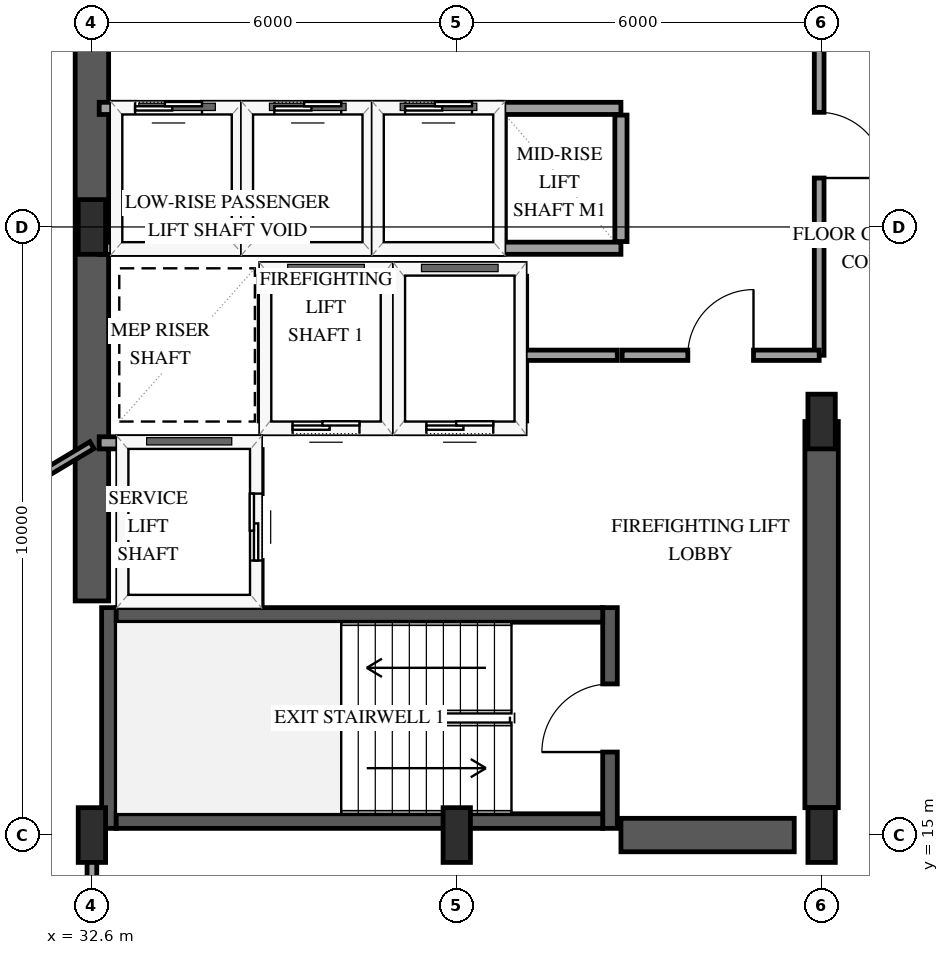
"""IFC4 building model, lengths in metres.
Left out: names, types, materials, properties, quantities, classifications, styles, units other than length and angle.
Written with IfcOpenShell. Run it as: python <this file> out.ifc"""

import sys

from ifc_helpers import new_model, si_unit, direction, frame, frame_2d, origin, origin_2d, place, context, subcontext, project, spatial, rectangle, extrude, element, fill, save


model = new_model("IFC4")
c1 = context("Model", 3, precision=1e-05, world=origin(), true_north=direction((0.0, 1.0)))
c2 = subcontext(c1, "Body", "Model", "MODEL_VIEW")
j1 = project(units=[si_unit("LENGTHUNIT", "METRE"), si_unit("PLANEANGLEUNIT", "RADIAN")], contexts=[c1])
p1 = place(None, origin())
s1 = spatial("IfcSite", under=j1, at=p1, CompositionType="ELEMENT")
p2 = place(p1, origin())
s2 = spatial("IfcBuilding", under=s1, at=p2, CompositionType="ELEMENT")
p3 = place(p2, frame((0.0, 0.0, 110.8)))
s3 = spatial("IfcBuildingStorey", under=s2, at=p3, CompositionType="ELEMENT", Elevation=110.8)
p4 = place(p3, frame((32.88, 15.11, 0.0), z_axis=(0.0, 0.0, 1.0), x_axis=(0.0, 1.0, 0.0)))
e1 = element("IfcWall", 1, at=p4, inside=s3, PredefinedType="SHEAR", context=c2, shape_type="SweptSolid", body=[
    extrude(rectangle(XDim=3.63, YDim=0.24, at=frame_2d((1.815, 0.0))), origin(), (0.0, 0.0, 1.0), 3.9),
])
p5 = place(p3, frame((41.12, 15.11, 0.0), z_axis=(0.0, 0.0, 1.0), x_axis=(0.0, 1.0, 0.0)))
e2 = element("IfcWall", 2, at=p5, inside=s3, PredefinedType="SHEAR", context=c2, shape_type="SweptSolid", body=[
    extrude(rectangle(XDim=3.63, YDim=0.24, at=frame_2d((1.815, 0.0))), origin(), (0.0, 0.0, 1.0), 3.9),
])
p6 = place(p5, frame((1.255, 0.0, 0.0)))
e3 = element("IfcOpeningElement", 3, at=p6, cuts=e2, PredefinedType="OPENING", context=c2, shape_type="SweptSolid", body=[
    extrude(rectangle(XDim=1.12, YDim=2.15, at=frame_2d((0.56, 1.075))), frame((0.0, 0.13, 0.0), z_axis=(0.0, -1.0, 0.0), x_axis=(1.0, 0.0, 0.0)), (0.0, 0.0, 1.0), 0.26),
])
for number, where, z_axis, x_axis in (
    (4, (33.0, 15.23, 0.0), (0.0, 0.0, 1.0), (1.0, 0.0, 0.0)),
    (5, (33.0, 18.62, 0.0), (0.0, 0.0, 1.0), (1.0, 0.0, 0.0)),
):
    element("IfcWall", number, at=place(p3, frame(where, z_axis=z_axis, x_axis=x_axis)), inside=s3, PredefinedType="SHEAR", context=c2, shape_type="SweptSolid", body=[
        extrude(rectangle(XDim=8.0, YDim=0.24, at=frame_2d((4.0, 0.0))), origin(), (0.0, 0.0, 1.0), 3.9),
    ])
p7 = place(p3, frame((32.6, 18.85, 0.0), z_axis=(0.0, 0.0, 1.0), x_axis=(0.0, 1.0, 0.0)))
e6 = element("IfcWall", 6, at=p7, inside=s3, PredefinedType="SHEAR", context=c2, shape_type="SweptSolid", body=[
    extrude(rectangle(XDim=12.3, YDim=0.55, at=frame_2d((6.15, 0.0))), origin(), (0.0, 0.0, 1.0), 3.9),
])
p8 = place(p3, frame((41.3, 15.0, 0.0), z_axis=(0.0, 0.0, 1.0), x_axis=(1.0, 0.0, 0.0)))
e7 = element("IfcWall", 7, at=p8, inside=s3, PredefinedType="SHEAR", context=c2, shape_type="SweptSolid", body=[
    extrude(rectangle(XDim=2.85, YDim=0.55, at=frame_2d((1.425, 0.0))), origin(), (0.0, 0.0, 1.0), 3.9),
])
p9 = place(p3, frame((44.6, 15.45, 0.0), z_axis=(0.0, 0.0, 1.0), x_axis=(0.0, 1.0, 0.0)))
e8 = element("IfcWall", 8, at=p9, inside=s3, PredefinedType="SHEAR", context=c2, shape_type="SweptSolid", body=[
    extrude(rectangle(XDim=6.35, YDim=0.55, at=frame_2d((3.175, 0.0))), origin(), (0.0, 0.0, 1.0), 3.9),
])
for number, where, z_axis, x_axis in (
    (9, (32.6, 15.0, 0.0), (0.0, 0.0, 1.0), (1.0, 0.0, 0.0)),
    (10, (32.6, 25.0, 0.0), (0.0, 0.0, 1.0), (1.0, 0.0, 0.0)),
    (11, (38.6, 15.0, 0.0), (0.0, 0.0, 1.0), (1.0, 0.0, 0.0)),
    (12, (44.6, 15.0, 0.0), (0.0, 0.0, 1.0), (1.0, 0.0, 0.0)),
    (13, (44.6, 21.8, 0.0), (0.0, 0.0, 1.0), (1.0, 0.0, 0.0)),
):
    element("IfcColumn", number, at=place(p3, frame(where, z_axis=z_axis, x_axis=x_axis)), inside=s3, PredefinedType="PILASTER", context=c2, shape_type="SweptSolid", body=[
        extrude(rectangle(XDim=0.45, YDim=0.9, at=origin_2d()), origin(), (0.0, 0.0, 1.0), 3.9),
    ])
p10 = place(p3, frame((35.45, 21.7, 0.0), z_axis=(0.0, 0.0, 1.0), x_axis=(1.0, 0.0, 0.0)))
e14 = element("IfcWall", 14, at=p10, inside=s3, PredefinedType="SOLIDWALL", context=c2, shape_type="SweptSolid", body=[
    extrude(rectangle(XDim=2.0, YDim=0.2, at=frame_2d((1.0, 0.0))), origin(), (0.0, 0.0, 1.0), 3.6),
])
p11 = place(p10, frame((0.45, 0.0, 0.0)))
e15 = element("IfcOpeningElement", 15, at=p11, cuts=e14, PredefinedType="OPENING", context=c2, shape_type="SweptSolid", body=[
    extrude(rectangle(XDim=1.1, YDim=2.15, at=frame_2d((0.55, 1.075))), frame((0.0, 0.11, 0.0), z_axis=(0.0, -1.0, 0.0), x_axis=(1.0, 0.0, 0.0)), (0.0, 0.0, 1.0), 0.22),
])
p12 = place(p3, frame((35.45, 24.3, 0.0), z_axis=(0.0, 0.0, 1.0), x_axis=(1.0, 0.0, 0.0)))
e16 = element("IfcWall", 16, at=p12, inside=s3, PredefinedType="SOLIDWALL", context=c2, shape_type="SweptSolid", body=[
    extrude(rectangle(XDim=2.0, YDim=0.2, at=frame_2d((1.0, 0.0))), origin(), (0.0, 0.0, 1.0), 3.6),
])
for number, where, z_axis, x_axis in (
    (17, (35.45, 21.81, 0.0), (0.0, 0.0, 1.0), (0.0, 1.0, 0.0)),
    (18, (37.45, 21.81, 0.0), (0.0, 0.0, 1.0), (0.0, 1.0, 0.0)),
):
    element("IfcWall", number, at=place(p3, frame(where, z_axis=z_axis, x_axis=x_axis)), inside=s3, PredefinedType="SOLIDWALL", context=c2, shape_type="SweptSolid", body=[
        extrude(rectangle(XDim=2.38, YDim=0.2, at=frame_2d((1.19, 0.0))), origin(), (0.0, 0.0, 1.0), 3.6),
    ])
p13 = place(p3, frame((37.65, 21.7, 0.0), z_axis=(0.0, 0.0, 1.0), x_axis=(1.0, 0.0, 0.0)))
e19 = element("IfcWall", 19, at=p13, inside=s3, PredefinedType="SOLIDWALL", context=c2, shape_type="SweptSolid", body=[
    extrude(rectangle(XDim=2.0, YDim=0.2, at=frame_2d((1.0, 0.0))), origin(), (0.0, 0.0, 1.0), 3.6),
])
p14 = place(p13, frame((0.45, 0.0, 0.0)))
e20 = element("IfcOpeningElement", 20, at=p14, cuts=e19, PredefinedType="OPENING", context=c2, shape_type="SweptSolid", body=[
    extrude(rectangle(XDim=1.1, YDim=2.15, at=frame_2d((0.55, 1.075))), frame((0.0, 0.11, 0.0), z_axis=(0.0, -1.0, 0.0), x_axis=(1.0, 0.0, 0.0)), (0.0, 0.0, 1.0), 0.22),
])
p15 = place(p3, frame((37.65, 24.3, 0.0), z_axis=(0.0, 0.0, 1.0), x_axis=(1.0, 0.0, 0.0)))
e21 = element("IfcWall", 21, at=p15, inside=s3, PredefinedType="SOLIDWALL", context=c2, shape_type="SweptSolid", body=[
    extrude(rectangle(XDim=2.0, YDim=0.2, at=frame_2d((1.0, 0.0))), origin(), (0.0, 0.0, 1.0), 3.6),
])
p16 = place(p3, frame((39.65, 21.81, 0.0), z_axis=(0.0, 0.0, 1.0), x_axis=(0.0, 1.0, 0.0)))
e22 = element("IfcWall", 22, at=p16, inside=s3, PredefinedType="SOLIDWALL", context=c2, shape_type="SweptSolid", body=[
    extrude(rectangle(XDim=2.38, YDim=0.2, at=frame_2d((1.19, 0.0))), origin(), (0.0, 0.0, 1.0), 3.6),
])
p17 = place(p3, frame((32.72, 21.45, 0.0), z_axis=(0.0, 0.0, 1.0), x_axis=(1.0, 0.0, 0.0)))
e23 = element("IfcWall", 23, at=p17, inside=s3, PredefinedType="SOLIDWALL", context=c2, shape_type="SweptSolid", body=[
    extrude(rectangle(XDim=2.58, YDim=0.2, at=frame_2d((1.29, 0.0))), origin(), (0.0, 0.0, 1.0), 3.6),
])
p18 = place(p3, frame((35.3, 18.79, 0.0), z_axis=(0.0, 0.0, 1.0), x_axis=(0.0, 1.0, 0.0)))
e24 = element("IfcWall", 24, at=p18, inside=s3, PredefinedType="SOLIDWALL", context=c2, shape_type="SweptSolid", body=[
    extrude(rectangle(XDim=2.55, YDim=0.2, at=frame_2d((1.275, 0.0))), origin(), (0.0, 0.0, 1.0), 3.6),
])
p19 = place(p18, frame((0.725, 0.0, 0.0)))
e25 = element("IfcOpeningElement", 25, at=p19, cuts=e24, PredefinedType="OPENING", context=c2, shape_type="SweptSolid", body=[
    extrude(rectangle(XDim=1.1, YDim=2.15, at=frame_2d((0.55, 1.075))), frame((0.0, 0.11, 0.0), z_axis=(0.0, -1.0, 0.0), x_axis=(1.0, 0.0, 0.0)), (0.0, 0.0, 1.0), 0.22),
])
p20 = place(p3, frame((32.72, 24.65, 0.0), z_axis=(0.0, 0.0, 1.0), x_axis=(1.0, 0.0, 0.0)))
e26 = element("IfcWall", 26, at=p20, inside=s3, PredefinedType="SOLIDWALL", context=c2, shape_type="SweptSolid", body=[
    extrude(rectangle(XDim=2.28, YDim=0.2, at=frame_2d((1.14, 0.0))), origin(), (0.0, 0.0, 1.0), 3.6),
])
p21 = place(p3, frame((32.72, 26.95, 0.0), z_axis=(0.0, 0.0, 1.0), x_axis=(1.0, 0.0, 0.0)))
e27 = element("IfcWall", 27, at=p21, inside=s3, PredefinedType="SOLIDWALL", context=c2, shape_type="SweptSolid", body=[
    extrude(rectangle(XDim=2.28, YDim=0.2, at=frame_2d((1.14, 0.0))), origin(), (0.0, 0.0, 1.0), 3.6),
])
p22 = place(p21, frame((0.59, 0.0, 0.0)))
e28 = element("IfcOpeningElement", 28, at=p22, cuts=e27, PredefinedType="OPENING", context=c2, shape_type="SweptSolid", body=[
    extrude(rectangle(XDim=1.1, YDim=2.15, at=frame_2d((0.55, 1.075))), frame((0.0, 0.11, 0.0), z_axis=(0.0, -1.0, 0.0), x_axis=(1.0, 0.0, 0.0)), (0.0, 0.0, 1.0), 0.22),
])
p23 = place(p3, frame((35.0, 24.76, 0.0), z_axis=(0.0, 0.0, 1.0), x_axis=(0.0, 1.0, 0.0)))
e29 = element("IfcWall", 29, at=p23, inside=s3, PredefinedType="SOLIDWALL", context=c2, shape_type="SweptSolid", body=[
    extrude(rectangle(XDim=2.08, YDim=0.2, at=frame_2d((1.04, 0.0))), origin(), (0.0, 0.0, 1.0), 3.6),
])
p24 = place(p3, frame((35.15, 24.65, 0.0), z_axis=(0.0, 0.0, 1.0), x_axis=(1.0, 0.0, 0.0)))
e30 = element("IfcWall", 30, at=p24, inside=s3, PredefinedType="SOLIDWALL", context=c2, shape_type="SweptSolid", body=[
    extrude(rectangle(XDim=2.0, YDim=0.2, at=frame_2d((1.0, 0.0))), origin(), (0.0, 0.0, 1.0), 3.6),
])
p25 = place(p3, frame((35.15, 26.95, 0.0), z_axis=(0.0, 0.0, 1.0), x_axis=(1.0, 0.0, 0.0)))
e31 = element("IfcWall", 31, at=p25, inside=s3, PredefinedType="SOLIDWALL", context=c2, shape_type="SweptSolid", body=[
    extrude(rectangle(XDim=2.0, YDim=0.2, at=frame_2d((1.0, 0.0))), origin(), (0.0, 0.0, 1.0), 3.6),
])
p26 = place(p25, frame((0.45, 0.0, 0.0)))
e32 = element("IfcOpeningElement", 32, at=p26, cuts=e31, PredefinedType="OPENING", context=c2, shape_type="SweptSolid", body=[
    extrude(rectangle(XDim=1.1, YDim=2.15, at=frame_2d((0.55, 1.075))), frame((0.0, 0.11, 0.0), z_axis=(0.0, -1.0, 0.0), x_axis=(1.0, 0.0, 0.0)), (0.0, 0.0, 1.0), 0.22),
])
p27 = place(p3, frame((37.15, 24.76, 0.0), z_axis=(0.0, 0.0, 1.0), x_axis=(0.0, 1.0, 0.0)))
e33 = element("IfcWall", 33, at=p27, inside=s3, PredefinedType="SOLIDWALL", context=c2, shape_type="SweptSolid", body=[
    extrude(rectangle(XDim=2.08, YDim=0.2, at=frame_2d((1.04, 0.0))), origin(), (0.0, 0.0, 1.0), 3.6),
])
p28 = place(p3, frame((37.3, 24.65, 0.0), z_axis=(0.0, 0.0, 1.0), x_axis=(1.0, 0.0, 0.0)))
e34 = element("IfcWall", 34, at=p28, inside=s3, PredefinedType="SOLIDWALL", context=c2, shape_type="SweptSolid", body=[
    extrude(rectangle(XDim=2.0, YDim=0.2, at=frame_2d((1.0, 0.0))), origin(), (0.0, 0.0, 1.0), 3.6),
])
p29 = place(p3, frame((37.3, 26.95, 0.0), z_axis=(0.0, 0.0, 1.0), x_axis=(1.0, 0.0, 0.0)))
e35 = element("IfcWall", 35, at=p29, inside=s3, PredefinedType="SOLIDWALL", context=c2, shape_type="SweptSolid", body=[
    extrude(rectangle(XDim=2.0, YDim=0.2, at=frame_2d((1.0, 0.0))), origin(), (0.0, 0.0, 1.0), 3.6),
])
p30 = place(p29, frame((0.45, 0.0, 0.0)))
e36 = element("IfcOpeningElement", 36, at=p30, cuts=e35, PredefinedType="OPENING", context=c2, shape_type="SweptSolid", body=[
    extrude(rectangle(XDim=1.1, YDim=2.15, at=frame_2d((0.55, 1.075))), frame((0.0, 0.11, 0.0), z_axis=(0.0, -1.0, 0.0), x_axis=(1.0, 0.0, 0.0)), (0.0, 0.0, 1.0), 0.22),
])
p31 = place(p3, frame((39.3, 24.76, 0.0), z_axis=(0.0, 0.0, 1.0), x_axis=(0.0, 1.0, 0.0)))
e37 = element("IfcWall", 37, at=p31, inside=s3, PredefinedType="SOLIDWALL", context=c2, shape_type="SweptSolid", body=[
    extrude(rectangle(XDim=2.08, YDim=0.2, at=frame_2d((1.04, 0.0))), origin(), (0.0, 0.0, 1.0), 3.6),
])
for number, where, z_axis, x_axis in (
    (38, (39.3, 24.65, 0.0), (0.0, 0.0, 1.0), (1.0, 0.0, 0.0)),
    (39, (39.3, 26.95, 0.0), (0.0, 0.0, 1.0), (1.0, 0.0, 0.0)),
):
    element("IfcWall", number, at=place(p3, frame(where, z_axis=z_axis, x_axis=x_axis)), inside=s3, PredefinedType="SOLIDWALL", context=c2, shape_type="SweptSolid", body=[
        extrude(rectangle(XDim=2.0, YDim=0.2, at=frame_2d((1.0, 0.0))), origin(), (0.0, 0.0, 1.0), 3.6),
    ])
p32 = place(p3, frame((41.3, 24.76, 0.0), z_axis=(0.0, 0.0, 1.0), x_axis=(0.0, 1.0, 0.0)))
e40 = element("IfcWall", 40, at=p32, inside=s3, PredefinedType="SOLIDWALL", context=c2, shape_type="SweptSolid", body=[
    extrude(rectangle(XDim=2.08, YDim=0.2, at=frame_2d((1.04, 0.0))), origin(), (0.0, 0.0, 1.0), 3.6),
])
p33 = place(p3, frame((44.56, 29.8, 0.0), z_axis=(0.0, 0.0, 1.0), x_axis=(0.0, -1.0, 0.0)))
e41 = element("IfcWall", 41, at=p33, inside=s3, PredefinedType="PARTITIONING", context=c2, shape_type="SweptSolid", body=[
    extrude(rectangle(XDim=6.91, YDim=0.16, at=frame_2d((3.455, 0.0))), origin(), (0.0, 0.0, 1.0), 2.64),
])
p34 = place(p33, frame((2.915, 0.0, 0.0)))
e42 = element("IfcOpeningElement", 42, at=p34, cuts=e41, PredefinedType="OPENING", context=c2, shape_type="SweptSolid", body=[
    extrude(rectangle(XDim=1.08, YDim=2.15, at=frame_2d((0.54, 1.075))), frame((0.0, 0.09, 0.0), z_axis=(0.0, -1.0, 0.0), x_axis=(1.0, 0.0, 0.0)), (0.0, 0.0, 1.0), 0.18),
])
p35 = place(p3, frame((32.6, 21.411, 0.0), z_axis=(0.0, 0.0, 1.0), x_axis=(-0.858275512682, -0.513189189608, 0.0)))
e43 = element("IfcWall", 43, at=p35, inside=s3, PredefinedType="PARTITIONING", context=c2, shape_type="SweptSolid", body=[
    extrude(rectangle(XDim=5.828, YDim=0.13, at=frame_2d((2.914, 0.0))), origin(), (0.0, 0.0, 1.0), 2.978),
])
p36 = place(p3, frame((41.32, 22.89, 0.0), z_axis=(0.0, 0.0, 1.0), x_axis=(1.0, 0.0, 0.0)))
e44 = element("IfcWall", 44, at=p36, inside=s3, PredefinedType="PARTITIONING", context=c2, shape_type="SweptSolid", body=[
    extrude(rectangle(XDim=3.24, YDim=0.17, at=frame_2d((1.62, 0.0))), origin(), (0.0, 0.0, 1.0), 3.6),
])
p37 = place(p36, frame((1.08, 0.0, 0.0)))
e45 = element("IfcOpeningElement", 45, at=p37, cuts=e44, PredefinedType="OPENING", context=c2, shape_type="SweptSolid", body=[
    extrude(rectangle(XDim=1.08, YDim=2.15, at=frame_2d((0.54, 1.075))), frame((0.0, 0.095, 0.0), z_axis=(0.0, -1.0, 0.0), x_axis=(1.0, 0.0, 0.0)), (0.0, 0.0, 1.0), 0.19),
])
p38 = place(p3, frame((32.6, 11.798, 0.0), z_axis=(0.0, 0.0, 1.0), x_axis=(0.0, 1.0, 0.0)))
e46 = element("IfcWall", 46, at=p38, inside=s3, PredefinedType="PARTITIONING", context=c2, shape_type="SweptSolid", body=[
    extrude(rectangle(XDim=3.132, YDim=0.16, at=frame_2d((1.566, 0.0))), origin(), (0.0, 0.0, 1.0), 3.6),
])
p39 = place(p3, frame((39.72, 22.89, 0.0), z_axis=(0.0, 0.0, 1.0), x_axis=(1.0, 0.0, 0.0)))
e47 = element("IfcWall", 47, at=p39, inside=s3, PredefinedType="PARTITIONING", context=c2, shape_type="SweptSolid", body=[
    extrude(rectangle(XDim=1.52, YDim=0.17, at=frame_2d((0.76, 0.0))), origin(), (0.0, 0.0, 1.0), 3.6),
])
p40 = place(p11, origin())
e48 = element("IfcDoor", 48, at=p40, inside=s3, OperationType="SLIDING_TO_LEFT", PredefinedType="DOOR", context=c2, shape_type="SweptSolid", body=[
    extrude(rectangle(XDim=1.1, YDim=2.15, at=frame_2d((0.55, 1.075))), frame((0.0, 0.025, 0.0), z_axis=(0.0, -1.0, 0.0), x_axis=(1.0, 0.0, 0.0)), (0.0, 0.0, 1.0), 0.05),
])
fill(e15, e48)
p41 = place(p14, origin())
e49 = element("IfcDoor", 49, at=p41, inside=s3, OperationType="SLIDING_TO_LEFT", PredefinedType="DOOR", context=c2, shape_type="SweptSolid", body=[
    extrude(rectangle(XDim=1.1, YDim=2.15, at=frame_2d((0.55, 1.075))), frame((0.0, 0.025, 0.0), z_axis=(0.0, -1.0, 0.0), x_axis=(1.0, 0.0, 0.0)), (0.0, 0.0, 1.0), 0.05),
])
fill(e20, e49)
p42 = place(p19, origin())
e50 = element("IfcDoor", 50, at=p42, inside=s3, OperationType="SLIDING_TO_LEFT", PredefinedType="DOOR", context=c2, shape_type="SweptSolid", body=[
    extrude(rectangle(XDim=1.1, YDim=2.15, at=frame_2d((0.55, 1.075))), frame((0.0, 0.025, 0.0), z_axis=(0.0, -1.0, 0.0), x_axis=(1.0, 0.0, 0.0)), (0.0, 0.0, 1.0), 0.05),
])
fill(e25, e50)
p43 = place(p22, origin())
e51 = element("IfcDoor", 51, at=p43, inside=s3, OperationType="SLIDING_TO_LEFT", PredefinedType="DOOR", context=c2, shape_type="SweptSolid", body=[
    extrude(rectangle(XDim=1.1, YDim=2.15, at=frame_2d((0.55, 1.075))), frame((0.0, 0.025, 0.0), z_axis=(0.0, -1.0, 0.0), x_axis=(1.0, 0.0, 0.0)), (0.0, 0.0, 1.0), 0.05),
])
fill(e28, e51)
p44 = place(p26, origin())
e52 = element("IfcDoor", 52, at=p44, inside=s3, OperationType="SLIDING_TO_LEFT", PredefinedType="DOOR", context=c2, shape_type="SweptSolid", body=[
    extrude(rectangle(XDim=1.1, YDim=2.15, at=frame_2d((0.55, 1.075))), frame((0.0, 0.025, 0.0), z_axis=(0.0, -1.0, 0.0), x_axis=(1.0, 0.0, 0.0)), (0.0, 0.0, 1.0), 0.05),
])
fill(e32, e52)
p45 = place(p30, origin())
e53 = element("IfcDoor", 53, at=p45, inside=s3, OperationType="SLIDING_TO_LEFT", PredefinedType="DOOR", context=c2, shape_type="SweptSolid", body=[
    extrude(rectangle(XDim=1.1, YDim=2.15, at=frame_2d((0.55, 1.075))), frame((0.0, 0.025, 0.0), z_axis=(0.0, -1.0, 0.0), x_axis=(1.0, 0.0, 0.0)), (0.0, 0.0, 1.0), 0.05),
])
fill(e36, e53)
p46 = place(p6, origin())
e54 = element("IfcDoor", 54, at=p46, inside=s3, OperationType="SINGLE_SWING_LEFT", PredefinedType="DOOR", context=c2, shape_type="SweptSolid", body=[
    extrude(rectangle(XDim=1.12, YDim=2.15, at=frame_2d((0.56, 1.075))), frame((0.0, 0.025, 0.0), z_axis=(0.0, -1.0, 0.0), x_axis=(1.0, 0.0, 0.0)), (0.0, 0.0, 1.0), 0.05),
])
fill(e3, e54)
p47 = place(p34, origin())
e55 = element("IfcDoor", 55, at=p47, inside=s3, OperationType="SINGLE_SWING_RIGHT", PredefinedType="DOOR", context=c2, shape_type="SweptSolid", body=[
    extrude(rectangle(XDim=1.08, YDim=2.15, at=frame_2d((0.54, 1.075))), frame((0.0, 0.025, 0.0), z_axis=(0.0, -1.0, 0.0), x_axis=(1.0, 0.0, 0.0)), (0.0, 0.0, 1.0), 0.05),
])
fill(e42, e55)
p48 = place(p37, origin())
e56 = element("IfcDoor", 56, at=p48, inside=s3, OperationType="SINGLE_SWING_RIGHT", PredefinedType="DOOR", context=c2, shape_type="SweptSolid", body=[
    extrude(rectangle(XDim=1.08, YDim=2.15, at=frame_2d((0.54, 1.075))), frame((0.0, 0.025, 0.0), z_axis=(0.0, -1.0, 0.0), x_axis=(1.0, 0.0, 0.0)), (0.0, 0.0, 1.0), 0.05),
])
fill(e45, e56)
save(model, sys.argv[1])
